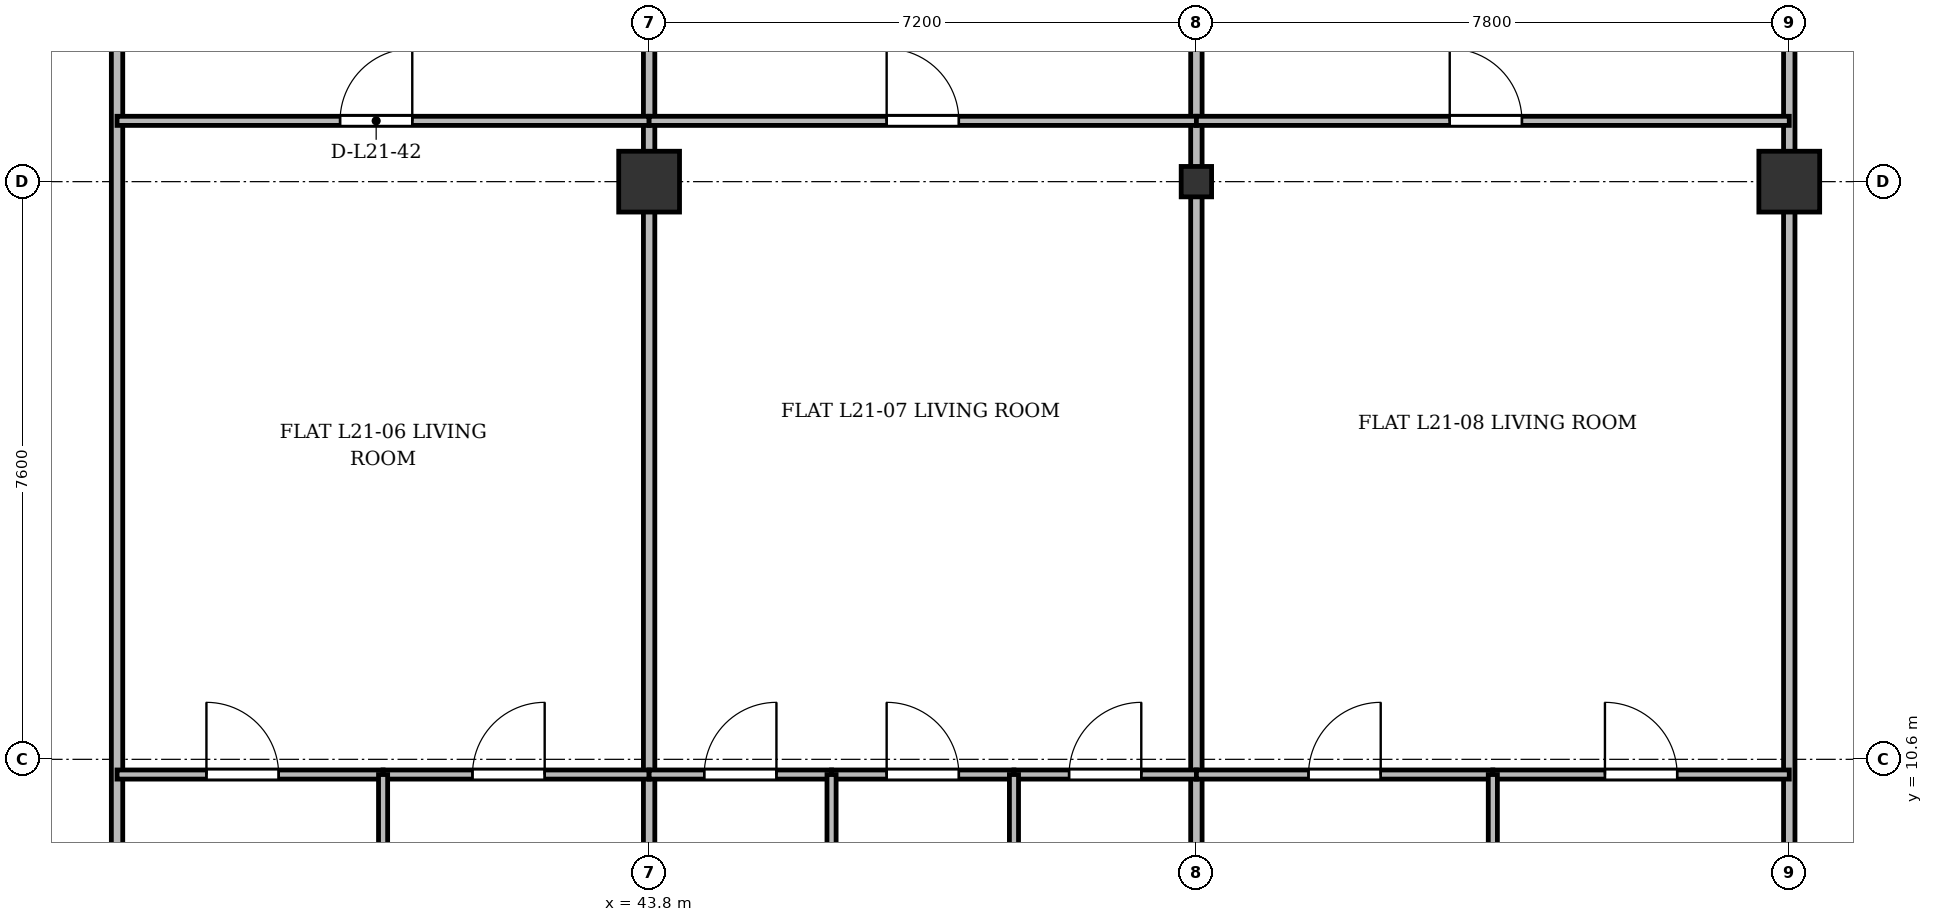
"""IFC4 building model, lengths in metres.
Left out: names, types, materials, properties, quantities, classifications, styles, units other than length and angle.
Written with IfcOpenShell. Run it as: python <this file> out.ifc"""

import sys

from ifc_helpers import new_model, si_unit, direction, frame, frame_2d, origin, origin_2d, place, context, subcontext, project, spatial, rectangle, i_section, extrude, source, transform, mapped, element, fill, save


model = new_model("IFC4")
c1 = context("Model", 3, precision=1e-05, world=origin(), true_north=direction((0.0, 1.0)))
c2 = subcontext(c1, "Body", "Model", "MODEL_VIEW")
j1 = project(units=[si_unit("LENGTHUNIT", "METRE"), si_unit("PLANEANGLEUNIT", "RADIAN")], contexts=[c1])
p1 = place(None, origin())
s1 = spatial("IfcSite", under=j1, at=p1, CompositionType="ELEMENT")
p2 = place(p1, origin())
s2 = spatial("IfcBuilding", under=s1, at=p2, CompositionType="ELEMENT")
p3 = place(p2, frame((0.0, 0.0, 85.3)))
s3 = spatial("IfcBuildingStorey", under=s2, at=p3, CompositionType="ELEMENT", Elevation=85.3)
m1 = source(origin(), c2, "Body", "SweptSolid", [
    extrude(rectangle(XDim=0.8, YDim=0.8, at=origin_2d()), origin(), (0.0, 0.0, 1.0), 3.6),
])
p4 = place(p3, frame((43.8, 18.2, 0.0), z_axis=(0.0, 0.0, 1.0), x_axis=(1.0, 0.0, 0.0)))
e1 = element("IfcColumn", 1, at=p4, inside=s3, PredefinedType="COLUMN", context=c2, shape_type="MappedRepresentation", body=[
    mapped(m1, transform((0.0, 0.0, 0.0), x_axis=(1.0, 0.0, 0.0), y_axis=(0.0, 1.0, 0.0), z_axis=(0.0, 0.0, 1.0), scale=1.0)),
])
m2 = source(origin(), c2, "Body", "SweptSolid", [
    extrude(i_section(OverallWidth=0.4, OverallDepth=0.4, WebThickness=0.022, FlangeThickness=0.035, at=origin_2d()), origin(), (0.0, 0.0, 1.0), 3.6),
])
p5 = place(p3, frame((51.0, 18.2, 0.0), z_axis=(0.0, 0.0, 1.0), x_axis=(1.0, 0.0, 0.0)))
e2 = element("IfcColumn", 2, at=p5, inside=s3, PredefinedType="COLUMN", context=c2, shape_type="MappedRepresentation", body=[
    mapped(m2, transform((0.0, 0.0, 0.0), x_axis=(1.0, 0.0, 0.0), y_axis=(0.0, 1.0, 0.0), z_axis=(0.0, 0.0, 1.0), scale=1.0)),
])
p6 = place(p3, frame((58.8, 18.2, 0.0), z_axis=(0.0, 0.0, 1.0), x_axis=(1.0, 0.0, 0.0)))
e3 = element("IfcColumn", 3, at=p6, inside=s3, PredefinedType="COLUMN", context=c2, shape_type="MappedRepresentation", body=[
    mapped(m1, transform((0.0, 0.0, 0.0), x_axis=(1.0, 0.0, 0.0), y_axis=(0.0, 1.0, 0.0), z_axis=(0.0, 0.0, 1.0), scale=1.0)),
])
p7 = place(p3, frame((36.8, 3.145, 0.0), z_axis=(0.0, 0.0, 1.0), x_axis=(0.0, 1.0, 0.0)))
e4 = element("IfcWall", 4, at=p7, inside=s3, PredefinedType="PARTITIONING", context=c2, shape_type="SweptSolid", body=[
    extrude(rectangle(XDim=24.455, YDim=0.15, at=frame_2d((12.228, 0.0))), origin(), (0.0, 0.0, 1.0), 2.752),
])
for number, where, z_axis, x_axis in (
    (5, (43.8, 3.145, 0.0), (0.0, 0.0, 1.0), (0.0, 1.0, 0.0)),
    (6, (51.0, 3.145, 0.0), (0.0, 0.0, 1.0), (0.0, 1.0, 0.0)),
    (7, (58.8, 3.145, 0.0), (0.0, 0.0, 1.0), (0.0, 1.0, 0.0)),
):
    element("IfcWall", number, at=place(p3, frame(where, z_axis=z_axis, x_axis=x_axis)), inside=s3, PredefinedType="PARTITIONING", context=c2, shape_type="SweptSolid", body=[
        extrude(rectangle(XDim=24.455, YDim=0.15, at=frame_2d((12.228, 0.0))), origin(), (0.0, 0.0, 1.0), 2.84),
    ])
p8 = place(p3, frame((36.8, 19.0, 0.0), z_axis=(0.0, 0.0, 1.0), x_axis=(1.0, 0.0, 0.0)))
e8 = element("IfcWall", 8, at=p8, inside=s3, PredefinedType="PARTITIONING", context=c2, shape_type="SweptSolid", body=[
    extrude(rectangle(XDim=7.0, YDim=0.12, at=frame_2d((3.5, 0.0))), origin(), (0.0, 0.0, 1.0), 2.84),
])
p9 = place(p8, frame((2.934, 0.0, 0.0)))
e9 = element("IfcOpeningElement", 9, at=p9, cuts=e8, PredefinedType="OPENING", context=c2, shape_type="SweptSolid", body=[
    extrude(rectangle(XDim=0.95, YDim=2.15, at=frame_2d((0.475, 1.075))), frame((0.0, 0.07, 0.0), z_axis=(0.0, -1.0, 0.0), x_axis=(1.0, 0.0, 0.0)), (0.0, 0.0, 1.0), 0.14),
])
p10 = place(p3, frame((36.8, 10.4, 0.0), z_axis=(0.0, 0.0, 1.0), x_axis=(1.0, 0.0, 0.0)))
e10 = element("IfcWall", 10, at=p10, inside=s3, PredefinedType="PARTITIONING", context=c2, shape_type="SweptSolid", body=[
    extrude(rectangle(XDim=3.5, YDim=0.12, at=frame_2d((1.75, 0.0))), origin(), (0.0, 0.0, 1.0), 3.34),
])
p11 = place(p10, frame((1.176, 0.0, 0.0)))
e11 = element("IfcOpeningElement", 11, at=p11, cuts=e10, PredefinedType="OPENING", context=c2, shape_type="SweptSolid", body=[
    extrude(rectangle(XDim=0.95, YDim=2.15, at=frame_2d((0.475, 1.075))), frame((0.0, 0.07, 0.0), z_axis=(0.0, -1.0, 0.0), x_axis=(1.0, 0.0, 0.0)), (0.0, 0.0, 1.0), 0.14),
])
p12 = place(p3, frame((40.3, 10.4, 0.0), z_axis=(0.0, 0.0, 1.0), x_axis=(1.0, 0.0, 0.0)))
e12 = element("IfcWall", 12, at=p12, inside=s3, PredefinedType="PARTITIONING", context=c2, shape_type="SweptSolid", body=[
    extrude(rectangle(XDim=3.5, YDim=0.12, at=frame_2d((1.75, 0.0))), origin(), (0.0, 0.0, 1.0), 2.84),
])
p13 = place(p12, frame((1.176, 0.0, 0.0)))
e13 = element("IfcOpeningElement", 13, at=p13, cuts=e12, PredefinedType="OPENING", context=c2, shape_type="SweptSolid", body=[
    extrude(rectangle(XDim=0.95, YDim=2.15, at=frame_2d((0.475, 1.075))), frame((0.0, 0.07, 0.0), z_axis=(0.0, -1.0, 0.0), x_axis=(1.0, 0.0, 0.0)), (0.0, 0.0, 1.0), 0.14),
])
p14 = place(p3, frame((40.3, 3.145, 0.0), z_axis=(0.0, 0.0, 1.0), x_axis=(0.0, 1.0, 0.0)))
e14 = element("IfcWall", 14, at=p14, inside=s3, PredefinedType="PARTITIONING", context=c2, shape_type="SweptSolid", body=[
    extrude(rectangle(XDim=7.255, YDim=0.12, at=frame_2d((3.627, 0.0))), origin(), (0.0, 0.0, 1.0), 2.752),
])
p15 = place(p3, frame((43.8, 19.0, 0.0), z_axis=(0.0, 0.0, 1.0), x_axis=(1.0, 0.0, 0.0)))
e15 = element("IfcWall", 15, at=p15, inside=s3, PredefinedType="PARTITIONING", context=c2, shape_type="SweptSolid", body=[
    extrude(rectangle(XDim=7.2, YDim=0.12, at=frame_2d((3.6, 0.0))), origin(), (0.0, 0.0, 1.0), 2.84),
])
p16 = place(p15, frame((3.125, 0.0, 0.0)))
e16 = element("IfcOpeningElement", 16, at=p16, cuts=e15, PredefinedType="OPENING", context=c2, shape_type="SweptSolid", body=[
    extrude(rectangle(XDim=0.95, YDim=2.15, at=frame_2d((0.475, 1.075))), frame((0.0, 0.07, 0.0), z_axis=(0.0, -1.0, 0.0), x_axis=(1.0, 0.0, 0.0)), (0.0, 0.0, 1.0), 0.14),
])
p17 = place(p3, frame((43.8, 10.4, 0.0), z_axis=(0.0, 0.0, 1.0), x_axis=(1.0, 0.0, 0.0)))
e17 = element("IfcWall", 17, at=p17, inside=s3, PredefinedType="PARTITIONING", context=c2, shape_type="SweptSolid", body=[
    extrude(rectangle(XDim=2.4, YDim=0.12, at=frame_2d((1.2, 0.0))), origin(), (0.0, 0.0, 1.0), 2.84),
])
p18 = place(p17, frame((0.725, 0.0, 0.0)))
e18 = element("IfcOpeningElement", 18, at=p18, cuts=e17, PredefinedType="OPENING", context=c2, shape_type="SweptSolid", body=[
    extrude(rectangle(XDim=0.95, YDim=2.15, at=frame_2d((0.475, 1.075))), frame((0.0, 0.07, 0.0), z_axis=(0.0, -1.0, 0.0), x_axis=(1.0, 0.0, 0.0)), (0.0, 0.0, 1.0), 0.14),
])
p19 = place(p3, frame((46.2, 10.4, 0.0), z_axis=(0.0, 0.0, 1.0), x_axis=(1.0, 0.0, 0.0)))
e19 = element("IfcWall", 19, at=p19, inside=s3, PredefinedType="PARTITIONING", context=c2, shape_type="SweptSolid", body=[
    extrude(rectangle(XDim=2.4, YDim=0.12, at=frame_2d((1.2, 0.0))), origin(), (0.0, 0.0, 1.0), 3.34),
])
p20 = place(p19, frame((0.725, 0.0, 0.0)))
e20 = element("IfcOpeningElement", 20, at=p20, cuts=e19, PredefinedType="OPENING", context=c2, shape_type="SweptSolid", body=[
    extrude(rectangle(XDim=0.95, YDim=2.15, at=frame_2d((0.475, 1.075))), frame((0.0, 0.07, 0.0), z_axis=(0.0, -1.0, 0.0), x_axis=(1.0, 0.0, 0.0)), (0.0, 0.0, 1.0), 0.14),
])
p21 = place(p3, frame((46.2, 3.145, 0.0), z_axis=(0.0, 0.0, 1.0), x_axis=(0.0, 1.0, 0.0)))
e21 = element("IfcWall", 21, at=p21, inside=s3, PredefinedType="PARTITIONING", context=c2, shape_type="SweptSolid", body=[
    extrude(rectangle(XDim=7.255, YDim=0.12, at=frame_2d((3.627, 0.0))), origin(), (0.0, 0.0, 1.0), 2.752),
])
p22 = place(p3, frame((48.6, 10.4, 0.0), z_axis=(0.0, 0.0, 1.0), x_axis=(1.0, 0.0, 0.0)))
e22 = element("IfcWall", 22, at=p22, inside=s3, PredefinedType="PARTITIONING", context=c2, shape_type="SweptSolid", body=[
    extrude(rectangle(XDim=2.4, YDim=0.12, at=frame_2d((1.2, 0.0))), origin(), (0.0, 0.0, 1.0), 2.84),
])
p23 = place(p22, frame((0.725, 0.0, 0.0)))
e23 = element("IfcOpeningElement", 23, at=p23, cuts=e22, PredefinedType="OPENING", context=c2, shape_type="SweptSolid", body=[
    extrude(rectangle(XDim=0.95, YDim=2.15, at=frame_2d((0.475, 1.075))), frame((0.0, 0.07, 0.0), z_axis=(0.0, -1.0, 0.0), x_axis=(1.0, 0.0, 0.0)), (0.0, 0.0, 1.0), 0.14),
])
p24 = place(p3, frame((48.6, 3.145, 0.0), z_axis=(0.0, 0.0, 1.0), x_axis=(0.0, 1.0, 0.0)))
e24 = element("IfcWall", 24, at=p24, inside=s3, PredefinedType="PARTITIONING", context=c2, shape_type="SweptSolid", body=[
    extrude(rectangle(XDim=7.255, YDim=0.12, at=frame_2d((3.627, 0.0))), origin(), (0.0, 0.0, 1.0), 2.752),
])
p25 = place(p3, frame((51.0, 19.0, 0.0), z_axis=(0.0, 0.0, 1.0), x_axis=(1.0, 0.0, 0.0)))
e25 = element("IfcWall", 25, at=p25, inside=s3, PredefinedType="PARTITIONING", context=c2, shape_type="SweptSolid", body=[
    extrude(rectangle(XDim=7.8, YDim=0.12, at=frame_2d((3.9, 0.0))), origin(), (0.0, 0.0, 1.0), 2.84),
])
p26 = place(p25, frame((3.333, 0.0, 0.0)))
e26 = element("IfcOpeningElement", 26, at=p26, cuts=e25, PredefinedType="OPENING", context=c2, shape_type="SweptSolid", body=[
    extrude(rectangle(XDim=0.95, YDim=2.15, at=frame_2d((0.475, 1.075))), frame((0.0, 0.07, 0.0), z_axis=(0.0, -1.0, 0.0), x_axis=(1.0, 0.0, 0.0)), (0.0, 0.0, 1.0), 0.14),
])
p27 = place(p3, frame((51.0, 10.4, 0.0), z_axis=(0.0, 0.0, 1.0), x_axis=(1.0, 0.0, 0.0)))
e27 = element("IfcWall", 27, at=p27, inside=s3, PredefinedType="PARTITIONING", context=c2, shape_type="SweptSolid", body=[
    extrude(rectangle(XDim=3.9, YDim=0.12, at=frame_2d((1.95, 0.0))), origin(), (0.0, 0.0, 1.0), 2.84),
])
p28 = place(p27, frame((1.475, 0.0, 0.0)))
e28 = element("IfcOpeningElement", 28, at=p28, cuts=e27, PredefinedType="OPENING", context=c2, shape_type="SweptSolid", body=[
    extrude(rectangle(XDim=0.95, YDim=2.15, at=frame_2d((0.475, 1.075))), frame((0.0, 0.07, 0.0), z_axis=(0.0, -1.0, 0.0), x_axis=(1.0, 0.0, 0.0)), (0.0, 0.0, 1.0), 0.14),
])
p29 = place(p3, frame((54.9, 10.4, 0.0), z_axis=(0.0, 0.0, 1.0), x_axis=(1.0, 0.0, 0.0)))
e29 = element("IfcWall", 29, at=p29, inside=s3, PredefinedType="PARTITIONING", context=c2, shape_type="SweptSolid", body=[
    extrude(rectangle(XDim=3.9, YDim=0.12, at=frame_2d((1.95, 0.0))), origin(), (0.0, 0.0, 1.0), 2.84),
])
p30 = place(p29, frame((1.475, 0.0, 0.0)))
e30 = element("IfcOpeningElement", 30, at=p30, cuts=e29, PredefinedType="OPENING", context=c2, shape_type="SweptSolid", body=[
    extrude(rectangle(XDim=0.95, YDim=2.15, at=frame_2d((0.475, 1.075))), frame((0.0, 0.07, 0.0), z_axis=(0.0, -1.0, 0.0), x_axis=(1.0, 0.0, 0.0)), (0.0, 0.0, 1.0), 0.14),
])
p31 = place(p3, frame((54.9, 3.145, 0.0), z_axis=(0.0, 0.0, 1.0), x_axis=(0.0, 1.0, 0.0)))
e31 = element("IfcWall", 31, at=p31, inside=s3, PredefinedType="PARTITIONING", context=c2, shape_type="SweptSolid", body=[
    extrude(rectangle(XDim=7.255, YDim=0.12, at=frame_2d((3.627, 0.0))), origin(), (0.0, 0.0, 1.0), 2.752),
])
m3 = source(origin(), c2, "Body", "SweptSolid", [
    extrude(rectangle(XDim=0.95, YDim=2.15, at=frame_2d((0.475, 1.075))), frame((0.0, 0.025, 0.0), z_axis=(0.0, -1.0, 0.0), x_axis=(1.0, 0.0, 0.0)), (0.0, 0.0, 1.0), 0.05),
])
p32 = place(p9, origin())
e32 = element("IfcDoor", 32, at=p32, inside=s3, OperationType="SINGLE_SWING_RIGHT", PredefinedType="DOOR", context=c2, shape_type="MappedRepresentation", body=[
    mapped(m3, transform((0.0, 0.0, 0.0), x_axis=(1.0, 0.0, 0.0), y_axis=(0.0, 1.0, 0.0), z_axis=(0.0, 0.0, 1.0), scale=1.0)),
])
fill(e9, e32)
p33 = place(p11, origin())
e33 = element("IfcDoor", 33, at=p33, inside=s3, OperationType="SINGLE_SWING_LEFT", PredefinedType="DOOR", context=c2, shape_type="MappedRepresentation", body=[
    mapped(m3, transform((0.0, 0.0, 0.0), x_axis=(1.0, 0.0, 0.0), y_axis=(0.0, 1.0, 0.0), z_axis=(0.0, 0.0, 1.0), scale=1.0)),
])
fill(e11, e33)
p34 = place(p13, origin())
e34 = element("IfcDoor", 34, at=p34, inside=s3, OperationType="SINGLE_SWING_RIGHT", PredefinedType="DOOR", context=c2, shape_type="MappedRepresentation", body=[
    mapped(m3, transform((0.0, 0.0, 0.0), x_axis=(1.0, 0.0, 0.0), y_axis=(0.0, 1.0, 0.0), z_axis=(0.0, 0.0, 1.0), scale=1.0)),
])
fill(e13, e34)
p35 = place(p16, origin())
e35 = element("IfcDoor", 35, at=p35, inside=s3, OperationType="SINGLE_SWING_LEFT", PredefinedType="DOOR", context=c2, shape_type="MappedRepresentation", body=[
    mapped(m3, transform((0.0, 0.0, 0.0), x_axis=(1.0, 0.0, 0.0), y_axis=(0.0, 1.0, 0.0), z_axis=(0.0, 0.0, 1.0), scale=1.0)),
])
fill(e16, e35)
p36 = place(p18, origin())
e36 = element("IfcDoor", 36, at=p36, inside=s3, OperationType="SINGLE_SWING_RIGHT", PredefinedType="DOOR", context=c2, shape_type="MappedRepresentation", body=[
    mapped(m3, transform((0.0, 0.0, 0.0), x_axis=(1.0, 0.0, 0.0), y_axis=(0.0, 1.0, 0.0), z_axis=(0.0, 0.0, 1.0), scale=1.0)),
])
fill(e18, e36)
p37 = place(p20, origin())
e37 = element("IfcDoor", 37, at=p37, inside=s3, OperationType="SINGLE_SWING_LEFT", PredefinedType="DOOR", context=c2, shape_type="MappedRepresentation", body=[
    mapped(m3, transform((0.0, 0.0, 0.0), x_axis=(1.0, 0.0, 0.0), y_axis=(0.0, 1.0, 0.0), z_axis=(0.0, 0.0, 1.0), scale=1.0)),
])
fill(e20, e37)
p38 = place(p23, origin())
e38 = element("IfcDoor", 38, at=p38, inside=s3, OperationType="SINGLE_SWING_RIGHT", PredefinedType="DOOR", context=c2, shape_type="MappedRepresentation", body=[
    mapped(m3, transform((0.0, 0.0, 0.0), x_axis=(1.0, 0.0, 0.0), y_axis=(0.0, 1.0, 0.0), z_axis=(0.0, 0.0, 1.0), scale=1.0)),
])
fill(e23, e38)
p39 = place(p26, origin())
e39 = element("IfcDoor", 39, at=p39, inside=s3, OperationType="SINGLE_SWING_LEFT", PredefinedType="DOOR", context=c2, shape_type="MappedRepresentation", body=[
    mapped(m3, transform((0.0, 0.0, 0.0), x_axis=(1.0, 0.0, 0.0), y_axis=(0.0, 1.0, 0.0), z_axis=(0.0, 0.0, 1.0), scale=1.0)),
])
fill(e26, e39)
p40 = place(p28, origin())
e40 = element("IfcDoor", 40, at=p40, inside=s3, OperationType="SINGLE_SWING_RIGHT", PredefinedType="DOOR", context=c2, shape_type="MappedRepresentation", body=[
    mapped(m3, transform((0.0, 0.0, 0.0), x_axis=(1.0, 0.0, 0.0), y_axis=(0.0, 1.0, 0.0), z_axis=(0.0, 0.0, 1.0), scale=1.0)),
])
fill(e28, e40)
p41 = place(p30, origin())
e41 = element("IfcDoor", 41, at=p41, inside=s3, OperationType="SINGLE_SWING_LEFT", PredefinedType="DOOR", context=c2, shape_type="MappedRepresentation", body=[
    mapped(m3, transform((0.0, 0.0, 0.0), x_axis=(1.0, 0.0, 0.0), y_axis=(0.0, 1.0, 0.0), z_axis=(0.0, 0.0, 1.0), scale=1.0)),
])
fill(e30, e41)
save(model, sys.argv[1])
